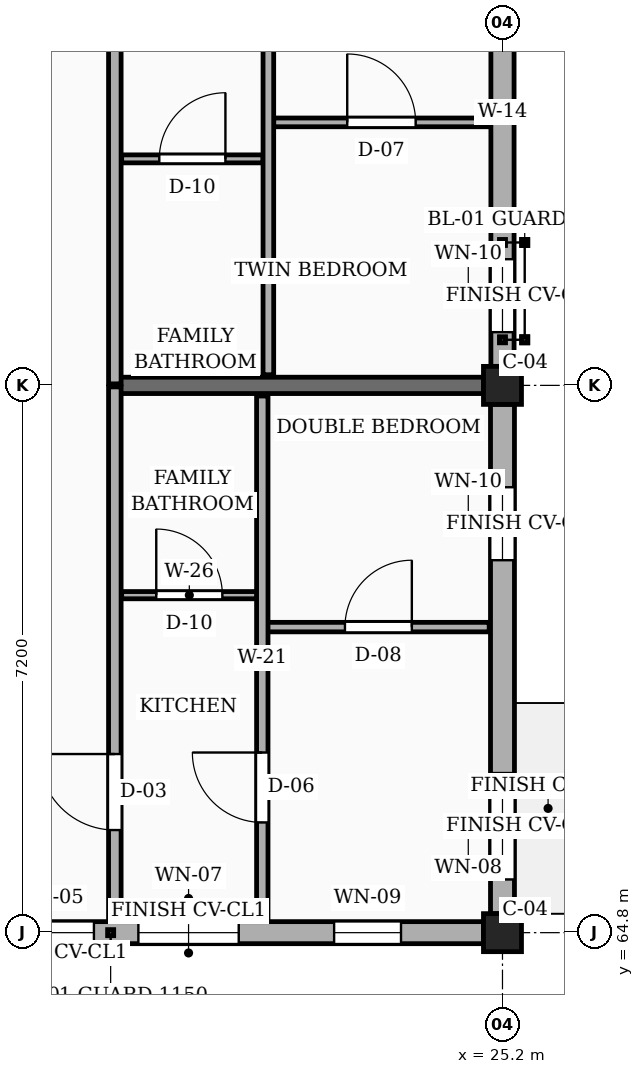
"""IFC4 building model, lengths in metres.
Left out: names, types, materials, properties, quantities, classifications, styles, units other than length and angle.
Written with IfcOpenShell. Run it as: python <this file> out.ifc"""

import sys

from ifc_helpers import new_model, si_unit, direction, frame, frame_2d, origin, origin_2d, place, context, subcontext, project, spatial, rectangle, extrude, element, fill, save


model = new_model("IFC4")
c1 = context("Model", 3, precision=1e-05, world=origin(), true_north=direction((0.0, 1.0)))
c2 = subcontext(c1, "Body", "Model", "MODEL_VIEW")
j1 = project(units=[si_unit("LENGTHUNIT", "METRE"), si_unit("PLANEANGLEUNIT", "RADIAN")], contexts=[c1])
p1 = place(None, origin())
s1 = spatial("IfcSite", under=j1, at=p1, CompositionType="ELEMENT")
p2 = place(p1, origin())
s2 = spatial("IfcBuilding", under=s1, at=p2, CompositionType="ELEMENT")
p3 = place(p2, frame((0.0, 0.0, 26.55)))
s3 = spatial("IfcBuildingStorey", under=s2, at=p3, CompositionType="ELEMENT", Elevation=26.55)
for number, where, z_axis, x_axis in (
    (1, (25.2, 64.8, 0.0), (0.0, 0.0, 1.0), (1.0, 0.0, 0.0)),
    (2, (25.2, 72.0, 0.0), (0.0, 0.0, 1.0), (1.0, 0.0, 0.0)),
):
    element("IfcColumn", number, at=place(p3, frame(where, z_axis=z_axis, x_axis=x_axis)), inside=s3, PredefinedType="COLUMN", context=c2, shape_type="SweptSolid", body=[
        extrude(rectangle(XDim=0.5, YDim=0.5, at=origin_2d()), origin(), (0.0, 0.0, 1.0), 3.15),
    ])
p4 = place(p3, frame((20.1, 72.0, 0.0), z_axis=(0.0, 0.0, 1.0), x_axis=(1.0, 0.0, 0.0)))
e3 = element("IfcWall", 3, at=p4, inside=s3, PredefinedType="SOLIDWALL", context=c2, shape_type="SweptSolid", body=[
    extrude(rectangle(XDim=4.85, YDim=0.215, at=frame_2d((2.425, 0.0))), origin(), (0.0, 0.0, 1.0), 2.22),
])
p5 = place(p3, frame((18.25, 64.8, 0.0), z_axis=(0.0, 0.0, 1.0), x_axis=(1.0, 0.0, 0.0)))
e4 = element("IfcWall", 4, at=p5, inside=s3, PredefinedType="SOLIDWALL", context=c2, shape_type="SweptSolid", body=[
    extrude(rectangle(XDim=6.7, YDim=0.29, at=frame_2d((3.35, 0.0))), origin(), (0.0, 0.0, 1.0), 2.46),
])
p6 = place(p5, frame((0.415, 0.0, 0.78)))
e5 = element("IfcOpeningElement", 5, at=p6, cuts=e4, PredefinedType="OPENING", context=c2, shape_type="SweptSolid", body=[
    extrude(rectangle(XDim=1.16, YDim=1.15, at=frame_2d((0.58, 0.575))), frame((0.0, 0.155, 0.0), z_axis=(0.0, -1.0, 0.0), x_axis=(1.0, 0.0, 0.0)), (0.0, 0.0, 1.0), 0.31),
])
p7 = place(p5, frame((2.16, 0.0, 0.78)))
e6 = element("IfcOpeningElement", 6, at=p7, cuts=e4, PredefinedType="OPENING", context=c2, shape_type="SweptSolid", body=[
    extrude(rectangle(XDim=1.32, YDim=1.15, at=frame_2d((0.66, 0.575))), frame((0.0, 0.155, 0.0), z_axis=(0.0, -1.0, 0.0), x_axis=(1.0, 0.0, 0.0)), (0.0, 0.0, 1.0), 0.31),
])
p8 = place(p5, frame((4.735, 0.0, 0.78)))
e7 = element("IfcOpeningElement", 7, at=p8, cuts=e4, PredefinedType="OPENING", context=c2, shape_type="SweptSolid", body=[
    extrude(rectangle(XDim=0.88, YDim=1.26, at=frame_2d((0.44, 0.63))), frame((0.0, 0.155, 0.0), z_axis=(0.0, -1.0, 0.0), x_axis=(1.0, 0.0, 0.0)), (0.0, 0.0, 1.0), 0.31),
])
p9 = place(p3, frame((25.2, 65.05, 0.0), z_axis=(0.0, 0.0, 1.0), x_axis=(0.0, 1.0, 0.0)))
e8 = element("IfcWall", 8, at=p9, inside=s3, PredefinedType="SOLIDWALL", context=c2, shape_type="SweptSolid", body=[
    extrude(rectangle(XDim=6.7, YDim=0.315, at=frame_2d((3.35, 0.0))), origin(), (0.0, 0.0, 1.0), 2.46),
])
p10 = place(p9, frame((0.45, 0.0, 0.78)))
e9 = element("IfcOpeningElement", 9, at=p10, cuts=e8, PredefinedType="OPENING", context=c2, shape_type="SweptSolid", body=[
    extrude(rectangle(XDim=1.4, YDim=1.15, at=frame_2d((0.7, 0.575))), frame((0.0, 0.167, 0.0), z_axis=(0.0, -1.0, 0.0), x_axis=(1.0, 0.0, 0.0)), (0.0, 0.0, 1.0), 0.335),
])
p11 = place(p9, frame((4.65, 0.0, 0.78)))
e10 = element("IfcOpeningElement", 10, at=p11, cuts=e8, PredefinedType="OPENING", context=c2, shape_type="SweptSolid", body=[
    extrude(rectangle(XDim=0.96, YDim=1.26, at=frame_2d((0.48, 0.63))), frame((0.0, 0.167, 0.0), z_axis=(0.0, -1.0, 0.0), x_axis=(1.0, 0.0, 0.0)), (0.0, 0.0, 1.0), 0.335),
])
p12 = place(p3, frame((25.2, 72.25, 0.0), z_axis=(0.0, 0.0, 1.0), x_axis=(0.0, 1.0, 0.0)))
e11 = element("IfcWall", 11, at=p12, inside=s3, PredefinedType="SOLIDWALL", context=c2, shape_type="SweptSolid", body=[
    extrude(rectangle(XDim=6.7, YDim=0.305, at=frame_2d((3.35, 0.0))), origin(), (0.0, 0.0, 1.0), 2.46),
])
p13 = place(p12, frame((0.45, 0.0, 0.78)))
e12 = element("IfcOpeningElement", 12, at=p13, cuts=e11, PredefinedType="OPENING", context=c2, shape_type="SweptSolid", body=[
    extrude(rectangle(XDim=0.96, YDim=1.26, at=frame_2d((0.48, 0.63))), frame((0.0, 0.163, 0.0), z_axis=(0.0, -1.0, 0.0), x_axis=(1.0, 0.0, 0.0)), (0.0, 0.0, 1.0), 0.325),
])
p14 = place(p12, frame((4.65, 0.0, 0.78)))
e13 = element("IfcOpeningElement", 13, at=p14, cuts=e11, PredefinedType="OPENING", context=c2, shape_type="SweptSolid", body=[
    extrude(rectangle(XDim=1.12, YDim=1.26, at=frame_2d((0.56, 0.63))), frame((0.0, 0.163, 0.0), z_axis=(0.0, -1.0, 0.0), x_axis=(1.0, 0.0, 0.0)), (0.0, 0.0, 1.0), 0.325),
])
p15 = place(p3, frame((20.1, 64.975, 0.0), z_axis=(0.0, 0.0, 1.0), x_axis=(0.0, 1.0, 0.0)))
e14 = element("IfcWall", 14, at=p15, inside=s3, PredefinedType="PARTITIONING", context=c2, shape_type="SweptSolid", body=[
    extrude(rectangle(XDim=7.005, YDim=0.165, at=frame_2d((3.502, 0.0))), origin(), (0.0, 0.0, 1.0), 2.325),
])
p16 = place(p15, frame((1.175, 0.0, 0.0)))
e15 = element("IfcOpeningElement", 15, at=p16, cuts=e14, PredefinedType="OPENING", context=c2, shape_type="SweptSolid", body=[
    extrude(rectangle(XDim=1.0, YDim=2.15, at=frame_2d((0.5, 1.075))), frame((0.0, 0.093, 0.0), z_axis=(0.0, -1.0, 0.0), x_axis=(1.0, 0.0, 0.0)), (0.0, 0.0, 1.0), 0.185),
])
p17 = place(p3, frame((20.1, 72.02, 0.0), z_axis=(0.0, 0.0, 1.0), x_axis=(0.0, 1.0, 0.0)))
e16 = element("IfcWall", 16, at=p17, inside=s3, PredefinedType="PARTITIONING", context=c2, shape_type="SweptSolid", body=[
    extrude(rectangle(XDim=7.16, YDim=0.165, at=frame_2d((3.58, 0.0))), origin(), (0.0, 0.0, 1.0), 2.325),
])
p18 = place(p17, frame((4.78, 0.0, 0.0)))
e17 = element("IfcOpeningElement", 17, at=p18, cuts=e16, PredefinedType="OPENING", context=c2, shape_type="SweptSolid", body=[
    extrude(rectangle(XDim=0.94, YDim=2.12, at=frame_2d((0.47, 1.06))), frame((0.0, 0.093, 0.0), z_axis=(0.0, -1.0, 0.0), x_axis=(1.0, 0.0, 0.0)), (0.0, 0.0, 1.0), 0.185),
])
p19 = place(p3, frame((22.11, 68.82, 0.0), z_axis=(0.0, 0.0, 1.0), x_axis=(1.0, 0.0, 0.0)))
e18 = element("IfcWall", 18, at=p19, inside=s3, PredefinedType="PARTITIONING", context=c2, shape_type="SweptSolid", body=[
    extrude(rectangle(XDim=2.915, YDim=0.125, at=frame_2d((1.458, 0.0))), origin(), (0.0, 0.0, 1.0), 2.325),
])
p20 = place(p19, frame((1.018, 0.0, 0.0)))
e19 = element("IfcOpeningElement", 19, at=p20, cuts=e18, PredefinedType="OPENING", context=c2, shape_type="SweptSolid", body=[
    extrude(rectangle(XDim=0.88, YDim=2.08, at=frame_2d((0.44, 1.04))), frame((0.0, 0.073, 0.0), z_axis=(0.0, -1.0, 0.0), x_axis=(1.0, 0.0, 0.0)), (0.0, 0.0, 1.0), 0.145),
])
p21 = place(p3, frame((20.19, 69.24, 0.0), z_axis=(0.0, 0.0, 1.0), x_axis=(1.0, 0.0, 0.0)))
e20 = element("IfcWall", 20, at=p21, inside=s3, PredefinedType="PARTITIONING", context=c2, shape_type="SweptSolid", body=[
    extrude(rectangle(XDim=1.78, YDim=0.095, at=frame_2d((0.89, 0.0))), origin(), (0.0, 0.0, 1.0), 2.325),
])
p22 = place(p21, frame((0.455, 0.0, 0.0)))
e21 = element("IfcOpeningElement", 21, at=p22, cuts=e20, PredefinedType="OPENING", context=c2, shape_type="SweptSolid", body=[
    extrude(rectangle(XDim=0.87, YDim=2.05, at=frame_2d((0.435, 1.025))), frame((0.0, 0.058, 0.0), z_axis=(0.0, -1.0, 0.0), x_axis=(1.0, 0.0, 0.0)), (0.0, 0.0, 1.0), 0.115),
])
p23 = place(p3, frame((22.04, 64.975, 0.0), z_axis=(0.0, 0.0, 1.0), x_axis=(0.0, 1.0, 0.0)))
e22 = element("IfcWall", 22, at=p23, inside=s3, PredefinedType="PARTITIONING", context=c2, shape_type="SweptSolid", body=[
    extrude(rectangle(XDim=6.885, YDim=0.15, at=frame_2d((3.442, 0.0))), origin(), (0.0, 0.0, 1.0), 2.325),
])
p24 = place(p23, frame((1.275, 0.0, 0.0)))
e23 = element("IfcOpeningElement", 23, at=p24, cuts=e22, PredefinedType="OPENING", context=c2, shape_type="SweptSolid", body=[
    extrude(rectangle(XDim=0.92, YDim=2.1, at=frame_2d((0.46, 1.05))), frame((0.0, 0.085, 0.0), z_axis=(0.0, -1.0, 0.0), x_axis=(1.0, 0.0, 0.0)), (0.0, 0.0, 1.0), 0.17),
])
p25 = place(p3, frame((22.19, 75.46, 0.0), z_axis=(0.0, 0.0, 1.0), x_axis=(1.0, 0.0, 0.0)))
e24 = element("IfcWall", 24, at=p25, inside=s3, PredefinedType="PARTITIONING", context=c2, shape_type="SweptSolid", body=[
    extrude(rectangle(XDim=2.835, YDim=0.115, at=frame_2d((1.417, 0.0))), origin(), (0.0, 0.0, 1.0), 2.325),
])
p26 = place(p25, frame((0.968, 0.0, 0.0)))
e25 = element("IfcOpeningElement", 25, at=p26, cuts=e24, PredefinedType="OPENING", context=c2, shape_type="SweptSolid", body=[
    extrude(rectangle(XDim=0.9, YDim=2.1, at=frame_2d((0.45, 1.05))), frame((0.0, 0.067, 0.0), z_axis=(0.0, -1.0, 0.0), x_axis=(1.0, 0.0, 0.0)), (0.0, 0.0, 1.0), 0.135),
])
p27 = place(p3, frame((20.19, 74.98, 0.0), z_axis=(0.0, 0.0, 1.0), x_axis=(1.0, 0.0, 0.0)))
e26 = element("IfcWall", 26, at=p27, inside=s3, PredefinedType="PARTITIONING", context=c2, shape_type="SweptSolid", body=[
    extrude(rectangle(XDim=1.86, YDim=0.105, at=frame_2d((0.93, 0.0))), origin(), (0.0, 0.0, 1.0), 2.325),
])
p28 = place(p27, frame((0.495, 0.0, 0.0)))
e27 = element("IfcOpeningElement", 27, at=p28, cuts=e26, PredefinedType="OPENING", context=c2, shape_type="SweptSolid", body=[
    extrude(rectangle(XDim=0.87, YDim=2.05, at=frame_2d((0.435, 1.025))), frame((0.0, 0.062, 0.0), z_axis=(0.0, -1.0, 0.0), x_axis=(1.0, 0.0, 0.0)), (0.0, 0.0, 1.0), 0.125),
])
p29 = place(p3, frame((22.12, 72.14, 0.0), z_axis=(0.0, 0.0, 1.0), x_axis=(0.0, 1.0, 0.0)))
e28 = element("IfcWall", 28, at=p29, inside=s3, PredefinedType="PARTITIONING", context=c2, shape_type="SweptSolid", body=[
    extrude(rectangle(XDim=6.92, YDim=0.14, at=frame_2d((3.46, 0.0))), origin(), (0.0, 0.0, 1.0), 2.325),
])
p30 = place(p29, frame((4.66, 0.0, 0.0)))
e29 = element("IfcOpeningElement", 29, at=p30, cuts=e28, PredefinedType="OPENING", context=c2, shape_type="SweptSolid", body=[
    extrude(rectangle(XDim=0.95, YDim=2.1, at=frame_2d((0.475, 1.05))), frame((0.0, 0.08, 0.0), z_axis=(0.0, -1.0, 0.0), x_axis=(1.0, 0.0, 0.0)), (0.0, 0.0, 1.0), 0.16),
])
p31 = place(p6, origin())
e30 = element("IfcWindow", 30, at=p31, inside=s3, PartitioningType="SINGLE_PANEL", PredefinedType="WINDOW", context=c2, shape_type="SweptSolid", body=[
    extrude(rectangle(XDim=1.16, YDim=1.15, at=frame_2d((0.58, 0.575))), frame((0.0, 0.03, 0.0), z_axis=(0.0, -1.0, 0.0), x_axis=(1.0, 0.0, 0.0)), (0.0, 0.0, 1.0), 0.06),
])
fill(e5, e30)
p32 = place(p7, origin())
e31 = element("IfcWindow", 31, at=p32, inside=s3, PartitioningType="SINGLE_PANEL", PredefinedType="WINDOW", context=c2, shape_type="SweptSolid", body=[
    extrude(rectangle(XDim=1.32, YDim=1.15, at=frame_2d((0.66, 0.575))), frame((0.0, 0.03, 0.0), z_axis=(0.0, -1.0, 0.0), x_axis=(1.0, 0.0, 0.0)), (0.0, 0.0, 1.0), 0.06),
])
fill(e6, e31)
p33 = place(p8, origin())
e32 = element("IfcWindow", 32, at=p33, inside=s3, PartitioningType="SINGLE_PANEL", PredefinedType="WINDOW", context=c2, shape_type="SweptSolid", body=[
    extrude(rectangle(XDim=0.88, YDim=1.26, at=frame_2d((0.44, 0.63))), frame((0.0, 0.03, 0.0), z_axis=(0.0, -1.0, 0.0), x_axis=(1.0, 0.0, 0.0)), (0.0, 0.0, 1.0), 0.06),
])
fill(e7, e32)
p34 = place(p10, origin())
e33 = element("IfcWindow", 33, at=p34, inside=s3, PartitioningType="SINGLE_PANEL", PredefinedType="WINDOW", context=c2, shape_type="SweptSolid", body=[
    extrude(rectangle(XDim=1.4, YDim=1.15, at=frame_2d((0.7, 0.575))), frame((0.0, 0.03, 0.0), z_axis=(0.0, -1.0, 0.0), x_axis=(1.0, 0.0, 0.0)), (0.0, 0.0, 1.0), 0.06),
])
fill(e9, e33)
p35 = place(p11, origin())
e34 = element("IfcWindow", 34, at=p35, inside=s3, PartitioningType="SINGLE_PANEL", PredefinedType="WINDOW", context=c2, shape_type="SweptSolid", body=[
    extrude(rectangle(XDim=0.96, YDim=1.26, at=frame_2d((0.48, 0.63))), frame((0.0, 0.03, 0.0), z_axis=(0.0, -1.0, 0.0), x_axis=(1.0, 0.0, 0.0)), (0.0, 0.0, 1.0), 0.06),
])
fill(e10, e34)
p36 = place(p13, origin())
e35 = element("IfcWindow", 35, at=p36, inside=s3, PartitioningType="SINGLE_PANEL", PredefinedType="WINDOW", context=c2, shape_type="SweptSolid", body=[
    extrude(rectangle(XDim=0.96, YDim=1.26, at=frame_2d((0.48, 0.63))), frame((0.0, 0.03, 0.0), z_axis=(0.0, -1.0, 0.0), x_axis=(1.0, 0.0, 0.0)), (0.0, 0.0, 1.0), 0.06),
])
fill(e12, e35)
p37 = place(p16, origin())
e36 = element("IfcDoor", 36, at=p37, inside=s3, OperationType="SINGLE_SWING_RIGHT", PredefinedType="DOOR", context=c2, shape_type="SweptSolid", body=[
    extrude(rectangle(XDim=1.0, YDim=2.15, at=frame_2d((0.5, 1.075))), frame((0.0, 0.025, 0.0), z_axis=(0.0, -1.0, 0.0), x_axis=(1.0, 0.0, 0.0)), (0.0, 0.0, 1.0), 0.05),
])
fill(e15, e36)
p38 = place(p20, origin())
e37 = element("IfcDoor", 37, at=p38, inside=s3, OperationType="SINGLE_SWING_RIGHT", PredefinedType="DOOR", context=c2, shape_type="SweptSolid", body=[
    extrude(rectangle(XDim=0.88, YDim=2.08, at=frame_2d((0.44, 1.04))), frame((0.0, 0.025, 0.0), z_axis=(0.0, -1.0, 0.0), x_axis=(1.0, 0.0, 0.0)), (0.0, 0.0, 1.0), 0.05),
])
fill(e19, e37)
p39 = place(p22, origin())
e38 = element("IfcDoor", 38, at=p39, inside=s3, OperationType="SINGLE_SWING_LEFT", PredefinedType="DOOR", context=c2, shape_type="SweptSolid", body=[
    extrude(rectangle(XDim=0.87, YDim=2.05, at=frame_2d((0.435, 1.025))), frame((0.0, 0.025, 0.0), z_axis=(0.0, -1.0, 0.0), x_axis=(1.0, 0.0, 0.0)), (0.0, 0.0, 1.0), 0.05),
])
fill(e21, e38)
p40 = place(p24, origin())
e39 = element("IfcDoor", 39, at=p40, inside=s3, OperationType="SINGLE_SWING_RIGHT", PredefinedType="DOOR", context=c2, shape_type="SweptSolid", body=[
    extrude(rectangle(XDim=0.92, YDim=2.1, at=frame_2d((0.46, 1.05))), frame((0.0, 0.025, 0.0), z_axis=(0.0, -1.0, 0.0), x_axis=(1.0, 0.0, 0.0)), (0.0, 0.0, 1.0), 0.05),
])
fill(e23, e39)
p41 = place(p26, origin())
e40 = element("IfcDoor", 40, at=p41, inside=s3, OperationType="SINGLE_SWING_LEFT", PredefinedType="DOOR", context=c2, shape_type="SweptSolid", body=[
    extrude(rectangle(XDim=0.9, YDim=2.1, at=frame_2d((0.45, 1.05))), frame((0.0, 0.025, 0.0), z_axis=(0.0, -1.0, 0.0), x_axis=(1.0, 0.0, 0.0)), (0.0, 0.0, 1.0), 0.05),
])
fill(e25, e40)
p42 = place(p28, origin())
e41 = element("IfcDoor", 41, at=p42, inside=s3, OperationType="SINGLE_SWING_RIGHT", PredefinedType="DOOR", context=c2, shape_type="SweptSolid", body=[
    extrude(rectangle(XDim=0.87, YDim=2.05, at=frame_2d((0.435, 1.025))), frame((0.0, 0.025, 0.0), z_axis=(0.0, -1.0, 0.0), x_axis=(1.0, 0.0, 0.0)), (0.0, 0.0, 1.0), 0.05),
])
fill(e27, e41)
save(model, sys.argv[1])
